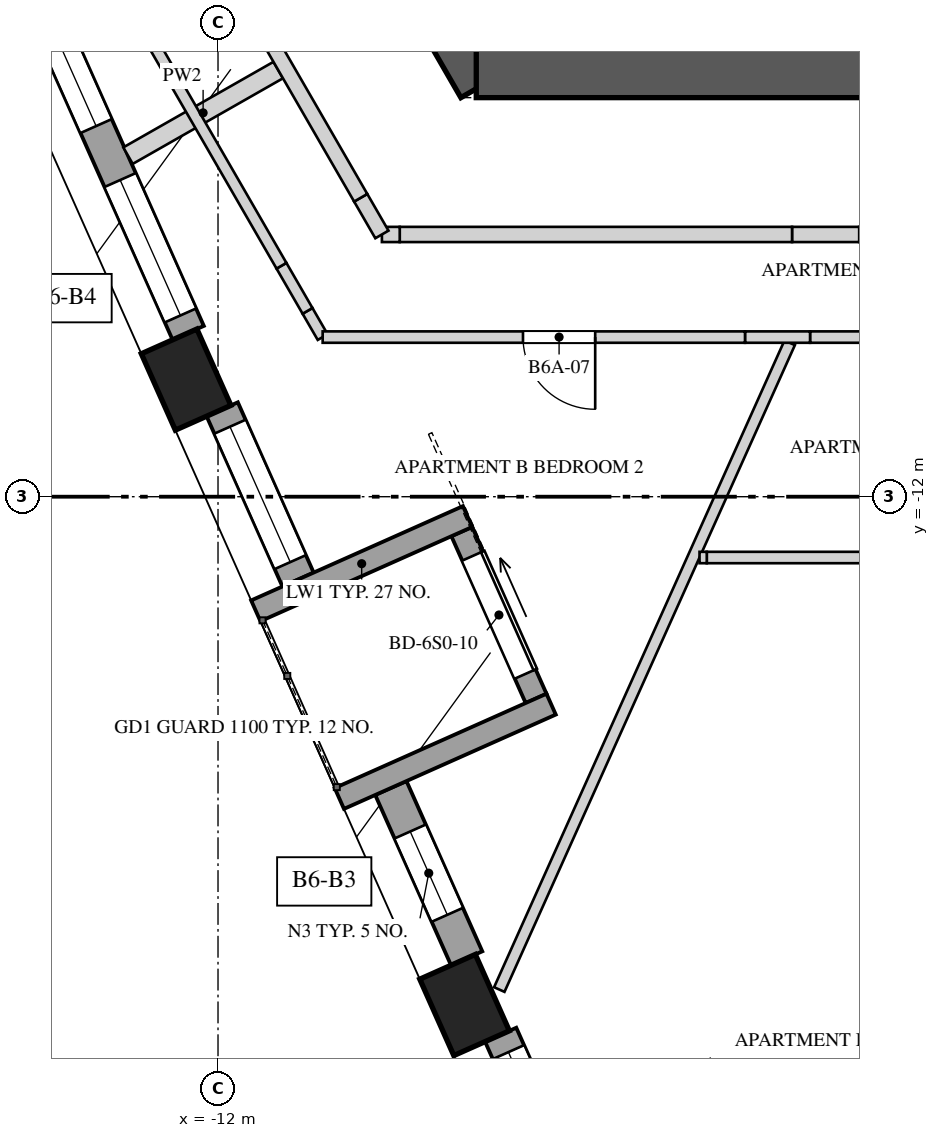
"""IFC4 building model, lengths in metres.
Left out: names, types, materials, properties, quantities, classifications, styles, units other than length and angle.
Written with IfcOpenShell. Run it as: python <this file> out.ifc"""

import sys

from ifc_helpers import new_model, si_unit, direction, frame, frame_2d, origin, origin_2d, place, context, subcontext, project, spatial, rectangle, extrude, element, fill, save


model = new_model("IFC4")
c1 = context("Model", 3, precision=1e-05, world=origin(), true_north=direction((0.0, 1.0)))
c2 = subcontext(c1, "Body", "Model", "MODEL_VIEW")
j1 = project(units=[si_unit("LENGTHUNIT", "METRE"), si_unit("PLANEANGLEUNIT", "RADIAN")], contexts=[c1])
p1 = place(None, origin())
s1 = spatial("IfcSite", under=j1, at=p1, CompositionType="ELEMENT")
p2 = place(p1, origin())
s2 = spatial("IfcBuilding", under=s1, at=p2, CompositionType="ELEMENT")
p3 = place(p2, frame((0.0, 0.0, 245.2)))
s3 = spatial("IfcBuildingStorey", under=s2, at=p3, CompositionType="ELEMENT", Elevation=245.2)
p4 = place(p3, frame((-9.945, -4.075, 0.0), z_axis=(0.0, 0.0, 1.0), x_axis=(0.499995765644, -0.866027848477, 0.0)))
e1 = element("IfcWall", 1, at=p4, inside=s3, PredefinedType="SHEAR", context=c2, shape_type="SweptSolid", body=[
    extrude(rectangle(XDim=2.887, YDim=0.7, at=frame_2d((1.443, 0.0))), origin(), (0.0, 0.0, 1.0), 4.0),
])
p5 = place(p3, frame((-8.603, -6.4, 0.0), z_axis=(0.0, 0.0, 1.0), x_axis=(1.0, 0.0, 0.0)))
e2 = element("IfcWall", 2, at=p5, inside=s3, PredefinedType="SHEAR", context=c2, shape_type="SweptSolid", body=[
    extrude(rectangle(XDim=17.205, YDim=0.7, at=frame_2d((8.603, 0.0))), origin(), (0.0, 0.0, 1.0), 4.0),
])
p6 = place(p5, frame((6.808, 0.0, 0.0)))
e3 = element("IfcOpeningElement", 3, at=p6, cuts=e2, PredefinedType="OPENING", context=c2, shape_type="SweptSolid", body=[
    extrude(rectangle(XDim=1.0, YDim=2.4, at=frame_2d((0.5, 1.2))), frame((0.0, 0.36, 0.0), z_axis=(0.0, -1.0, 0.0), x_axis=(1.0, 0.0, 0.0)), (0.0, 0.0, 1.0), 0.72),
])
for number, where, z_axis, x_axis in (
    (4, (-12.42, -10.459, 0.0), (0.0, 0.0, 1.0), (0.407, -0.914, 0.0)),
    (5, (-8.756, -18.687, 0.0), (0.0, 0.0, 1.0), (0.407, -0.914, 0.0)),
):
    element("IfcColumn", number, at=place(p3, frame(where, z_axis=z_axis, x_axis=x_axis)), inside=s3, PredefinedType="COLUMN", context=c2, shape_type="SweptSolid", body=[
        extrude(rectangle(XDim=1.1, YDim=0.8, at=origin_2d()), origin(), (0.0, 0.0, 1.0), 4.0),
    ])
p7 = place(p3, frame((-15.608, -2.622, 0.0), z_axis=(0.0, 0.0, 1.0), x_axis=(0.406748602972, -0.91354013266, 0.0)))
e6 = element("IfcWall", 6, at=p7, inside=s3, PredefinedType="SOLIDWALL", context=c2, shape_type="SweptSolid", body=[
    extrude(rectangle(XDim=7.907, YDim=0.45, at=frame_2d((3.953, 0.0))), origin(), (0.0, 0.0, 1.0), 3.3),
])
p8 = place(p7, frame((0.251, 0.0, 0.4)))
e7 = element("IfcOpeningElement", 7, at=p8, cuts=e6, PredefinedType="OPENING", context=c2, shape_type="SweptSolid", body=[
    extrude(rectangle(XDim=1.95, YDim=2.75, at=frame_2d((0.975, 1.375))), frame((0.0, 0.235, 0.0), z_axis=(0.0, -1.0, 0.0), x_axis=(1.0, 0.0, 0.0)), (0.0, 0.0, 1.0), 0.47),
])
p9 = place(p7, frame((2.978, 0.0, 0.4)))
e8 = element("IfcOpeningElement", 8, at=p9, cuts=e6, PredefinedType="OPENING", context=c2, shape_type="SweptSolid", body=[
    extrude(rectangle(XDim=1.95, YDim=2.75, at=frame_2d((0.975, 1.375))), frame((0.0, 0.235, 0.0), z_axis=(0.0, -1.0, 0.0), x_axis=(1.0, 0.0, 0.0)), (0.0, 0.0, 1.0), 0.47),
])
p10 = place(p7, frame((5.706, 0.0, 0.4)))
e9 = element("IfcOpeningElement", 9, at=p10, cuts=e6, PredefinedType="OPENING", context=c2, shape_type="SweptSolid", body=[
    extrude(rectangle(XDim=1.95, YDim=2.75, at=frame_2d((0.975, 1.375))), frame((0.0, 0.235, 0.0), z_axis=(0.0, -1.0, 0.0), x_axis=(1.0, 0.0, 0.0)), (0.0, 0.0, 1.0), 0.47),
])
p11 = place(p3, frame((-11.945, -10.85, 0.0), z_axis=(0.0, 0.0, 1.0), x_axis=(0.406784963852, -0.913523942316, 0.0)))
e10 = element("IfcWall", 10, at=p11, inside=s3, PredefinedType="SOLIDWALL", context=c2, shape_type="SweptSolid", body=[
    extrude(rectangle(XDim=2.452, YDim=0.45, at=frame_2d((1.226, 0.0))), origin(), (0.0, 0.0, 1.0), 3.3),
])
p12 = place(p11, frame((0.251, 0.0, 0.4)))
e11 = element("IfcOpeningElement", 11, at=p12, cuts=e10, PredefinedType="OPENING", context=c2, shape_type="SweptSolid", body=[
    extrude(rectangle(XDim=1.95, YDim=2.75, at=frame_2d((0.975, 1.375))), frame((0.0, 0.235, 0.0), z_axis=(0.0, -1.0, 0.0), x_axis=(1.0, 0.0, 0.0)), (0.0, 0.0, 1.0), 0.47),
])
p13 = place(p3, frame((-9.726, -15.833, 0.0), z_axis=(0.0, 0.0, 1.0), x_axis=(0.406701876909, -0.913560935745, 0.0)))
e12 = element("IfcWall", 12, at=p13, inside=s3, PredefinedType="SOLIDWALL", context=c2, shape_type="SweptSolid", body=[
    extrude(rectangle(XDim=2.452, YDim=0.45, at=frame_2d((1.226, 0.0))), origin(), (0.0, 0.0, 1.0), 3.3),
])
p14 = place(p13, frame((0.626, 0.0, 0.4)))
e13 = element("IfcOpeningElement", 13, at=p14, cuts=e12, PredefinedType="OPENING", context=c2, shape_type="SweptSolid", body=[
    extrude(rectangle(XDim=1.2, YDim=2.75, at=frame_2d((0.6, 1.375))), frame((0.0, 0.235, 0.0), z_axis=(0.0, -1.0, 0.0), x_axis=(1.0, 0.0, 0.0)), (0.0, 0.0, 1.0), 0.47),
])
p15 = place(p3, frame((-8.281, -19.078, 0.0), z_axis=(0.0, 0.0, 1.0), x_axis=(0.406701876909, -0.913560935745, 0.0)))
e14 = element("IfcWall", 14, at=p15, inside=s3, PredefinedType="SOLIDWALL", context=c2, shape_type="SweptSolid", body=[
    extrude(rectangle(XDim=2.452, YDim=0.45, at=frame_2d((1.226, 0.0))), origin(), (0.0, 0.0, 1.0), 3.3),
])
p16 = place(p15, frame((0.251, 0.0, 0.4)))
e15 = element("IfcOpeningElement", 15, at=p16, cuts=e14, PredefinedType="OPENING", context=c2, shape_type="SweptSolid", body=[
    extrude(rectangle(XDim=1.95, YDim=2.75, at=frame_2d((0.975, 1.375))), frame((0.0, 0.235, 0.0), z_axis=(0.0, -1.0, 0.0), x_axis=(1.0, 0.0, 0.0)), (0.0, 0.0, 1.0), 0.47),
])
p17 = place(p3, frame((-8.793, -12.459, 0.0), z_axis=(0.0, 0.0, 1.0), x_axis=(0.406723017018, -0.913551524232, 0.0)))
e16 = element("IfcWall", 16, at=p17, inside=s3, PredefinedType="SOLIDWALL", context=c2, shape_type="SweptSolid", body=[
    extrude(rectangle(XDim=2.402, YDim=0.3, at=frame_2d((1.201, 0.0))), origin(), (0.0, 0.0, 1.0), 3.3),
])
p18 = place(p17, frame((0.351, 0.0, 0.0)))
e17 = element("IfcOpeningElement", 17, at=p18, cuts=e16, PredefinedType="OPENING", context=c2, shape_type="SweptSolid", body=[
    extrude(rectangle(XDim=1.7, YDim=2.5, at=frame_2d((0.85, 1.25))), frame((0.0, 0.16, 0.0), z_axis=(0.0, -1.0, 0.0), x_axis=(1.0, 0.0, 0.0)), (0.0, 0.0, 1.0), 0.32),
])
for number, where, z_axis, x_axis in (
    (18, (-11.503, -13.501, 0.0), (0.0, 0.0, 1.0), (0.914, 0.407, 0.0)),
    (19, (-10.404, -15.97, 0.0), (0.0, 0.0, 1.0), (0.914, 0.407, 0.0)),
):
    element("IfcWall", number, at=place(p3, frame(where, z_axis=z_axis, x_axis=x_axis)), inside=s3, PredefinedType="SOLIDWALL", context=c2, shape_type="SweptSolid", body=[
        extrude(rectangle(XDim=3.05, YDim=0.3, at=frame_2d((1.525, 0.0))), origin(), (0.0, 0.0, 1.0), 3.3),
    ])
p19 = place(p3, frame((-11.208, -6.387, 0.0), z_axis=(0.0, 0.0, 1.0), x_axis=(-0.868850228445, -0.495075025153, 0.0)))
e20 = element("IfcWall", 20, at=p19, inside=s3, PredefinedType="SOLIDWALL", context=c2, shape_type="SweptSolid", body=[
    extrude(rectangle(XDim=2.274, YDim=0.25, at=frame_2d((1.137, 0.0))), origin(), (0.0, 0.0, 1.0), 3.65),
])
p20 = place(p3, frame((-10.623, -9.9, 0.0), z_axis=(0.0, 0.0, 1.0), x_axis=(-0.499899443193, 0.866083452501, 0.0)))
e21 = element("IfcWall", 21, at=p20, inside=s3, PredefinedType="PARTITIONING", context=c2, shape_type="SweptSolid", body=[
    extrude(rectangle(XDim=0.398, YDim=0.15, at=frame_2d((0.199, 0.0))), origin(), (0.0, 0.0, 1.0), 3.65),
])
p21 = place(p3, frame((-10.822, -9.555, 0.0), z_axis=(0.0, 0.0, 1.0), x_axis=(-0.499969057507, 0.866043267704, 0.0)))
e22 = element("IfcWall", 22, at=p21, inside=s3, PredefinedType="PARTITIONING", context=c2, shape_type="SweptSolid", body=[
    extrude(rectangle(XDim=0.686, YDim=0.15, at=frame_2d((0.343, 0.0))), origin(), (0.0, 0.0, 1.0), 2.95),
])
p22 = place(p3, frame((-11.165, -8.961, 0.0), z_axis=(0.0, 0.0, 1.0), x_axis=(-0.500009912158, 0.866019680922, 0.0)))
e23 = element("IfcWall", 23, at=p22, inside=s3, PredefinedType="PARTITIONING", context=c2, shape_type="SweptSolid", body=[
    extrude(rectangle(XDim=5.44, YDim=0.15, at=frame_2d((2.72, 0.0))), origin(), (0.0, 0.0, 1.0), 3.65),
])
p23 = place(p3, frame((-8.3, -18.484, 0.0), z_axis=(0.0, 0.0, 1.0), x_axis=(0.409625524412, 0.9122537639, 0.0)))
e24 = element("IfcWall", 24, at=p23, inside=s3, PredefinedType="PARTITIONING", context=c2, shape_type="SweptSolid", body=[
    extrude(rectangle(XDim=9.327, YDim=0.15, at=frame_2d((4.664, 0.0))), origin(), (0.0, 0.0, 1.0), 2.75),
])
p24 = place(p3, frame((-3.244, -9.9, 0.0), z_axis=(0.0, 0.0, 1.0), x_axis=(-1.0, 0.0, 0.0)))
e25 = element("IfcWall", 25, at=p24, inside=s3, PredefinedType="PARTITIONING", context=c2, shape_type="SweptSolid", body=[
    extrude(rectangle(XDim=0.967, YDim=0.15, at=frame_2d((0.484, 0.0))), origin(), (0.0, 0.0, 1.0), 3.65),
])
p25 = place(p3, frame((-4.211, -9.9, 0.0), z_axis=(0.0, 0.0, 1.0), x_axis=(-1.0, 0.0, 0.0)))
e26 = element("IfcWall", 26, at=p25, inside=s3, PredefinedType="PARTITIONING", context=c2, shape_type="SweptSolid", body=[
    extrude(rectangle(XDim=0.856, YDim=0.15, at=frame_2d((0.428, 0.0))), origin(), (0.0, 0.0, 1.0), 2.75),
])
p26 = place(p3, frame((-5.067, -9.9, 0.0), z_axis=(0.0, 0.0, 1.0), x_axis=(-1.0, 0.0, 0.0)))
e27 = element("IfcWall", 27, at=p26, inside=s3, PredefinedType="PARTITIONING", context=c2, shape_type="SweptSolid", body=[
    extrude(rectangle(XDim=5.556, YDim=0.15, at=frame_2d((2.778, 0.0))), origin(), (0.0, 0.0, 1.0), 3.65),
])
p27 = place(p26, frame((1.971, 0.0, 0.0)))
e28 = element("IfcOpeningElement", 28, at=p27, cuts=e27, PredefinedType="OPENING", context=c2, shape_type="SweptSolid", body=[
    extrude(rectangle(XDim=0.95, YDim=2.4, at=frame_2d((0.475, 1.2))), frame((0.0, 0.085, 0.0), z_axis=(0.0, -1.0, 0.0), x_axis=(1.0, 0.0, 0.0)), (0.0, 0.0, 1.0), 0.17),
])
p28 = place(p3, frame((-2.956, -12.8, 0.0), z_axis=(0.0, 0.0, 1.0), x_axis=(-1.0, 0.0, 0.0)))
e29 = element("IfcWall", 29, at=p28, inside=s3, PredefinedType="PARTITIONING", context=c2, shape_type="SweptSolid", body=[
    extrude(rectangle(XDim=2.614, YDim=0.15, at=frame_2d((1.307, 0.0))), origin(), (0.0, 0.0, 1.0), 3.65),
])
p29 = place(p3, frame((-5.57, -12.8, 0.0), z_axis=(0.0, 0.0, 1.0), x_axis=(-1.0, 0.0, 0.0)))
e30 = element("IfcWall", 30, at=p29, inside=s3, PredefinedType="PARTITIONING", context=c2, shape_type="SweptSolid", body=[
    extrude(rectangle(XDim=0.095, YDim=0.15, at=frame_2d((0.048, 0.0))), origin(), (0.0, 0.0, 1.0), 2.75),
])
p30 = place(p3, frame((-2.135, -8.55, 0.0), z_axis=(0.0, 0.0, 1.0), x_axis=(-1.0, 0.0, 0.0)))
e31 = element("IfcWall", 31, at=p30, inside=s3, PredefinedType="SOLIDWALL", context=c2, shape_type="SweptSolid", body=[
    extrude(rectangle(XDim=1.43, YDim=0.2, at=frame_2d((0.715, 0.0))), origin(), (0.0, 0.0, 1.0), 3.65),
])
p31 = place(p3, frame((-3.565, -8.55, 0.0), z_axis=(0.0, 0.0, 1.0), x_axis=(-1.0, 0.0, 0.0)))
e32 = element("IfcWall", 32, at=p31, inside=s3, PredefinedType="SOLIDWALL", context=c2, shape_type="SweptSolid", body=[
    extrude(rectangle(XDim=0.883, YDim=0.2, at=frame_2d((0.442, 0.0))), origin(), (0.0, 0.0, 1.0), 2.75),
])
p32 = place(p3, frame((-4.448, -8.55, 0.0), z_axis=(0.0, 0.0, 1.0), x_axis=(-1.0, 0.0, 0.0)))
e33 = element("IfcWall", 33, at=p32, inside=s3, PredefinedType="SOLIDWALL", context=c2, shape_type="SweptSolid", body=[
    extrude(rectangle(XDim=5.161, YDim=0.2, at=frame_2d((2.581, 0.0))), origin(), (0.0, 0.0, 1.0), 3.65),
])
p33 = place(p3, frame((-9.609, -8.55, 0.0), z_axis=(0.0, 0.0, 1.0), x_axis=(-1.0, 0.0, 0.0)))
e34 = element("IfcWall", 34, at=p33, inside=s3, PredefinedType="SOLIDWALL", context=c2, shape_type="SweptSolid", body=[
    extrude(rectangle(XDim=0.234, YDim=0.2, at=frame_2d((0.117, 0.0))), origin(), (0.0, 0.0, 1.0), 2.95),
])
p34 = place(p3, frame((-9.844, -8.55, 0.0), z_axis=(0.0, 0.0, 1.0), x_axis=(-0.500000383388, 0.866025182435, 0.0)))
e35 = element("IfcWall", 35, at=p34, inside=s3, PredefinedType="SOLIDWALL", context=c2, shape_type="SweptSolid", body=[
    extrude(rectangle(XDim=0.558, YDim=0.2, at=frame_2d((0.279, 0.0))), origin(), (0.0, 0.0, 1.0), 2.95),
])
p35 = place(p3, frame((-10.123, -8.067, 0.0), z_axis=(0.0, 0.0, 1.0), x_axis=(-0.500005339912, 0.866022320763, 0.0)))
e36 = element("IfcWall", 36, at=p35, inside=s3, PredefinedType="SOLIDWALL", context=c2, shape_type="SweptSolid", body=[
    extrude(rectangle(XDim=4.408, YDim=0.2, at=frame_2d((2.204, 0.0))), origin(), (0.0, 0.0, 1.0), 3.65),
])
p36 = place(p9, origin())
e37 = element("IfcWindow", 37, at=p36, inside=s3, PartitioningType="SINGLE_PANEL", PredefinedType="WINDOW", context=c2, shape_type="SweptSolid", body=[
    extrude(rectangle(XDim=1.95, YDim=2.75, at=frame_2d((0.975, 1.375))), frame((0.0, 0.03, 0.0), z_axis=(0.0, -1.0, 0.0), x_axis=(1.0, 0.0, 0.0)), (0.0, 0.0, 1.0), 0.06),
])
fill(e8, e37)
p37 = place(p10, origin())
e38 = element("IfcWindow", 38, at=p37, inside=s3, PartitioningType="SINGLE_PANEL", PredefinedType="WINDOW", context=c2, shape_type="SweptSolid", body=[
    extrude(rectangle(XDim=1.95, YDim=2.75, at=frame_2d((0.975, 1.375))), frame((0.0, 0.03, 0.0), z_axis=(0.0, -1.0, 0.0), x_axis=(1.0, 0.0, 0.0)), (0.0, 0.0, 1.0), 0.06),
])
fill(e9, e38)
p38 = place(p12, origin())
e39 = element("IfcWindow", 39, at=p38, inside=s3, PartitioningType="SINGLE_PANEL", PredefinedType="WINDOW", context=c2, shape_type="SweptSolid", body=[
    extrude(rectangle(XDim=1.95, YDim=2.75, at=frame_2d((0.975, 1.375))), frame((0.0, 0.03, 0.0), z_axis=(0.0, -1.0, 0.0), x_axis=(1.0, 0.0, 0.0)), (0.0, 0.0, 1.0), 0.06),
])
fill(e11, e39)
p39 = place(p14, origin())
e40 = element("IfcWindow", 40, at=p39, inside=s3, PartitioningType="SINGLE_PANEL", PredefinedType="WINDOW", context=c2, shape_type="SweptSolid", body=[
    extrude(rectangle(XDim=1.2, YDim=2.75, at=frame_2d((0.6, 1.375))), frame((0.0, 0.03, 0.0), z_axis=(0.0, -1.0, 0.0), x_axis=(1.0, 0.0, 0.0)), (0.0, 0.0, 1.0), 0.06),
])
fill(e13, e40)
p40 = place(p16, origin())
e41 = element("IfcWindow", 41, at=p40, inside=s3, PartitioningType="SINGLE_PANEL", PredefinedType="WINDOW", context=c2, shape_type="SweptSolid", body=[
    extrude(rectangle(XDim=1.95, YDim=2.75, at=frame_2d((0.975, 1.375))), frame((0.0, 0.03, 0.0), z_axis=(0.0, -1.0, 0.0), x_axis=(1.0, 0.0, 0.0)), (0.0, 0.0, 1.0), 0.06),
])
fill(e15, e41)
p41 = place(p18, origin())
e42 = element("IfcDoor", 42, at=p41, inside=s3, OperationType="SLIDING_TO_LEFT", PredefinedType="DOOR", context=c2, shape_type="SweptSolid", body=[
    extrude(rectangle(XDim=1.7, YDim=2.5, at=frame_2d((0.85, 1.25))), frame((0.0, 0.025, 0.0), z_axis=(0.0, -1.0, 0.0), x_axis=(1.0, 0.0, 0.0)), (0.0, 0.0, 1.0), 0.05),
])
fill(e17, e42)
p42 = place(p27, origin())
e43 = element("IfcDoor", 43, at=p42, inside=s3, OperationType="SINGLE_SWING_LEFT", PredefinedType="DOOR", context=c2, shape_type="SweptSolid", body=[
    extrude(rectangle(XDim=0.95, YDim=2.4, at=frame_2d((0.475, 1.2))), frame((0.0, 0.025, 0.0), z_axis=(0.0, -1.0, 0.0), x_axis=(1.0, 0.0, 0.0)), (0.0, 0.0, 1.0), 0.05),
])
fill(e28, e43)
save(model, sys.argv[1])
